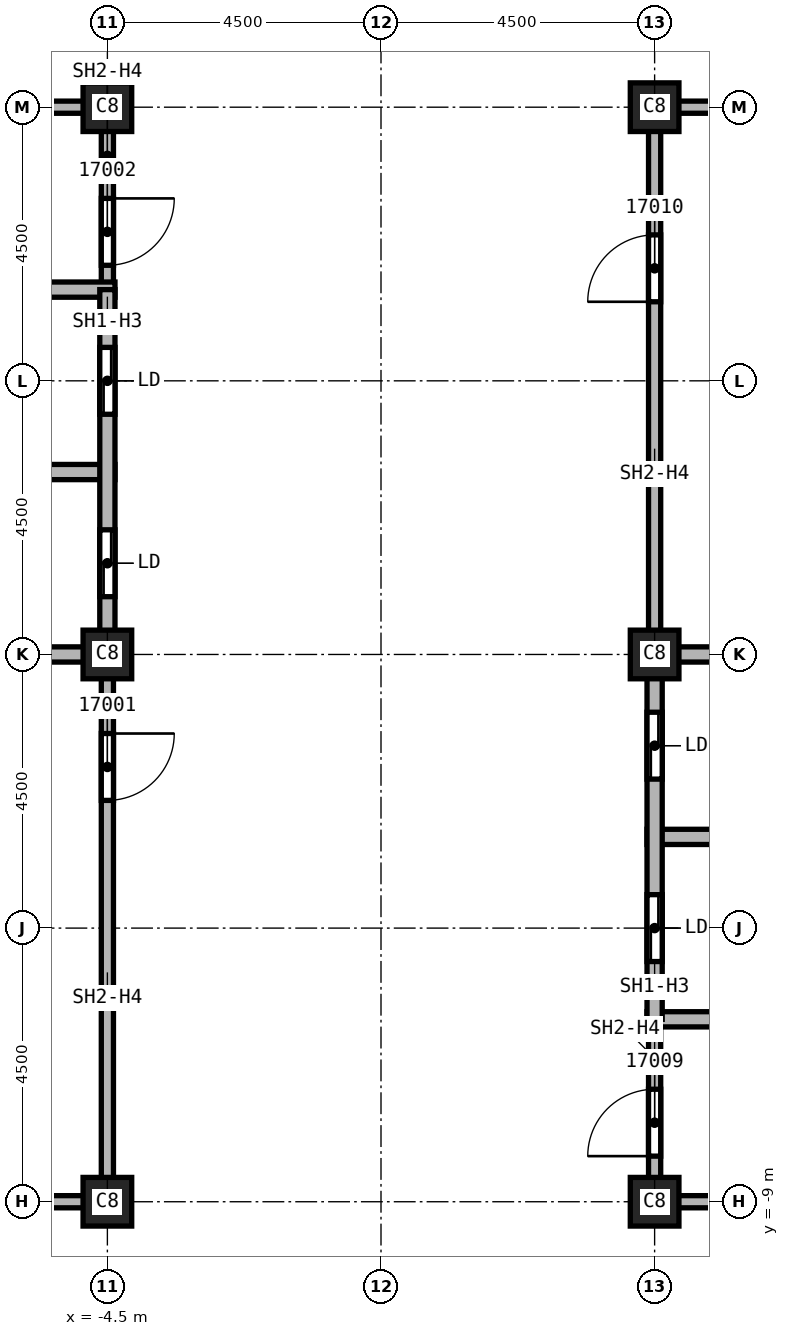
"""IFC4 building model, lengths in metres.
Left out: names, types, materials, properties, quantities, classifications, styles, units other than length and angle.
Written with IfcOpenShell. Run it as: python <this file> out.ifc"""

import sys

from ifc_helpers import new_model, si_unit, direction, frame, frame_2d, origin, origin_2d, place, context, subcontext, project, spatial, rectangle, extrude, element, fill, save


model = new_model("IFC4")
c1 = context("Model", 3, precision=1e-05, world=origin(), true_north=direction((0.0, 1.0)))
c2 = subcontext(c1, "Body", "Model", "MODEL_VIEW")
j1 = project(units=[si_unit("LENGTHUNIT", "METRE"), si_unit("PLANEANGLEUNIT", "RADIAN")], contexts=[c1])
p1 = place(None, origin())
s1 = spatial("IfcSite", under=j1, at=p1, CompositionType="ELEMENT")
p2 = place(p1, origin())
s2 = spatial("IfcBuilding", under=s1, at=p2, CompositionType="ELEMENT")
p3 = place(p2, frame((0.0, 0.0, 254.0)))
s3 = spatial("IfcBuildingStorey", under=s2, at=p3, CompositionType="ELEMENT", Elevation=254.0)
for number, where, z_axis, x_axis in (
    (1, (4.5, 0.0, 0.0), (0.0, 0.0, 1.0), (1.0, 0.0, 0.0)),
    (2, (4.5, 9.0, 0.0), (0.0, 0.0, 1.0), (1.0, 0.0, 0.0)),
    (3, (4.5, -9.0, 0.0), (0.0, 0.0, 1.0), (1.0, 0.0, 0.0)),
    (4, (-4.5, 0.0, 0.0), (0.0, 0.0, 1.0), (1.0, 0.0, 0.0)),
    (5, (-4.5, 9.0, 0.0), (0.0, 0.0, 1.0), (1.0, 0.0, 0.0)),
    (6, (-4.5, -9.0, 0.0), (0.0, 0.0, 1.0), (1.0, 0.0, 0.0)),
):
    element("IfcColumn", number, at=place(p3, frame(where, z_axis=z_axis, x_axis=x_axis)), inside=s3, PredefinedType="COLUMN", context=c2, shape_type="SweptSolid", body=[
        extrude(rectangle(XDim=0.8, YDim=0.8, at=origin_2d()), origin(), (0.0, 0.0, 1.0), 3.72),
    ])
for number, where, z_axis, x_axis in (
    (7, (-7.5, 9.0, 0.0), (0.0, 0.0, 1.0), (1.0, 0.0, 0.0)),
    (8, (-4.5, -9.0, 0.0), (0.0, 0.0, 1.0), (-1.0, 0.0, 0.0)),
):
    element("IfcWall", number, at=place(p3, frame(where, z_axis=z_axis, x_axis=x_axis)), inside=s3, PredefinedType="SOLIDWALL", context=c2, shape_type="SweptSolid", body=[
        extrude(rectangle(XDim=3.0, YDim=0.2, at=frame_2d((1.5, 0.0))), origin(), (0.0, 0.0, 1.0), 3.042),
    ])
p4 = place(p3, frame((-4.5, 0.0, 0.0), z_axis=(0.0, 0.0, 1.0), x_axis=(0.0, -1.0, 0.0)))
e9 = element("IfcWall", 9, at=p4, inside=s3, PredefinedType="SOLIDWALL", context=c2, shape_type="SweptSolid", body=[
    extrude(rectangle(XDim=9.1, YDim=0.2, at=frame_2d((4.55, 0.0))), origin(), (0.0, 0.0, 1.0), 3.042),
])
p5 = place(p4, frame((1.3, 0.0, 0.0)))
e10 = element("IfcOpeningElement", 10, at=p5, cuts=e9, PredefinedType="OPENING", context=c2, shape_type="SweptSolid", body=[
    extrude(rectangle(XDim=1.1, YDim=2.1, at=frame_2d((0.55, 1.05))), frame((0.0, 0.1, 0.0), z_axis=(0.0, -1.0, 0.0), x_axis=(1.0, 0.0, 0.0)), (0.0, 0.0, 1.0), 0.2),
])
p6 = place(p3, frame((-4.5, 9.1, 0.0), z_axis=(0.0, 0.0, 1.0), x_axis=(0.0, -1.0, 0.0)))
e11 = element("IfcWall", 11, at=p6, inside=s3, PredefinedType="SOLIDWALL", context=c2, shape_type="SweptSolid", body=[
    extrude(rectangle(XDim=3.1, YDim=0.2, at=frame_2d((1.55, 0.0))), origin(), (0.0, 0.0, 1.0), 3.042),
])
p7 = place(p6, frame((1.6, 0.0, 0.0)))
e12 = element("IfcOpeningElement", 12, at=p7, cuts=e11, PredefinedType="OPENING", context=c2, shape_type="SweptSolid", body=[
    extrude(rectangle(XDim=1.1, YDim=2.1, at=frame_2d((0.55, 1.05))), frame((0.0, 0.1, 0.0), z_axis=(0.0, -1.0, 0.0), x_axis=(1.0, 0.0, 0.0)), (0.0, 0.0, 1.0), 0.2),
])
p8 = place(p3, frame((4.5, -9.1, 0.0), z_axis=(0.0, 0.0, 1.0), x_axis=(0.0, 1.0, 0.0)))
e13 = element("IfcWall", 13, at=p8, inside=s3, PredefinedType="SOLIDWALL", context=c2, shape_type="SweptSolid", body=[
    extrude(rectangle(XDim=3.1, YDim=0.2, at=frame_2d((1.55, 0.0))), origin(), (0.0, 0.0, 1.0), 3.042),
])
p9 = place(p8, frame((0.85, 0.0, 0.0)))
e14 = element("IfcOpeningElement", 14, at=p9, cuts=e13, PredefinedType="OPENING", context=c2, shape_type="SweptSolid", body=[
    extrude(rectangle(XDim=1.1, YDim=2.1, at=frame_2d((0.55, 1.05))), frame((0.0, 0.1, 0.0), z_axis=(0.0, -1.0, 0.0), x_axis=(1.0, 0.0, 0.0)), (0.0, 0.0, 1.0), 0.2),
])
p10 = place(p3, frame((4.5, 0.0, 0.0), z_axis=(0.0, 0.0, 1.0), x_axis=(0.0, 1.0, 0.0)))
e15 = element("IfcWall", 15, at=p10, inside=s3, PredefinedType="SOLIDWALL", context=c2, shape_type="SweptSolid", body=[
    extrude(rectangle(XDim=9.1, YDim=0.2, at=frame_2d((4.55, 0.0))), origin(), (0.0, 0.0, 1.0), 3.042),
])
p11 = place(p10, frame((5.8, 0.0, 0.0)))
e16 = element("IfcOpeningElement", 16, at=p11, cuts=e15, PredefinedType="OPENING", context=c2, shape_type="SweptSolid", body=[
    extrude(rectangle(XDim=1.1, YDim=2.1, at=frame_2d((0.55, 1.05))), frame((0.0, 0.1, 0.0), z_axis=(0.0, -1.0, 0.0), x_axis=(1.0, 0.0, 0.0)), (0.0, 0.0, 1.0), 0.2),
])
for number, where, z_axis, x_axis in (
    (17, (4.5, 9.0, 0.0), (0.0, 0.0, 1.0), (1.0, 0.0, 0.0)),
    (18, (7.5, -9.0, 0.0), (0.0, 0.0, 1.0), (-1.0, 0.0, 0.0)),
):
    element("IfcWall", number, at=place(p3, frame(where, z_axis=z_axis, x_axis=x_axis)), inside=s3, PredefinedType="SOLIDWALL", context=c2, shape_type="SweptSolid", body=[
        extrude(rectangle(XDim=3.0, YDim=0.2, at=frame_2d((1.5, 0.0))), origin(), (0.0, 0.0, 1.0), 3.042),
    ])
p12 = place(p3, frame((-13.625, 3.0, 0.0), z_axis=(0.0, 0.0, 1.0), x_axis=(1.0, 0.0, 0.0)))
e19 = element("IfcWall", 19, at=p12, inside=s3, PredefinedType="SOLIDWALL", context=c2, shape_type="SweptSolid", body=[
    extrude(rectangle(XDim=9.25, YDim=0.25, at=frame_2d((4.625, 0.0))), origin(), (0.0, 0.0, 1.0), 3.72),
])
p13 = place(p12, frame((3.25, 0.0, 0.0)))
e20 = element("IfcOpeningElement", 20, at=p13, cuts=e19, PredefinedType="OPENING", context=c2, shape_type="SweptSolid", body=[
    extrude(rectangle(XDim=1.1, YDim=2.1, at=frame_2d((0.55, 1.05))), frame((0.0, 0.125, 0.0), z_axis=(0.0, -1.0, 0.0), x_axis=(1.0, 0.0, 0.0)), (0.0, 0.0, 1.0), 0.25),
])
for number, where, z_axis, x_axis in (
    (21, (-7.625, 0.0, 0.0), (0.0, 0.0, 1.0), (1.0, 0.0, 0.0)),
    (22, (-7.625, 6.0, 0.0), (0.0, 0.0, 1.0), (1.0, 0.0, 0.0)),
):
    element("IfcWall", number, at=place(p3, frame(where, z_axis=z_axis, x_axis=x_axis)), inside=s3, PredefinedType="SOLIDWALL", context=c2, shape_type="SweptSolid", body=[
        extrude(rectangle(XDim=3.25, YDim=0.25, at=frame_2d((1.625, 0.0))), origin(), (0.0, 0.0, 1.0), 3.72),
    ])
p14 = place(p3, frame((-4.5, 6.0, 0.0), z_axis=(0.0, 0.0, 1.0), x_axis=(0.0, -1.0, 0.0)))
e23 = element("IfcWall", 23, at=p14, inside=s3, PredefinedType="SOLIDWALL", context=c2, shape_type="SweptSolid", body=[
    extrude(rectangle(XDim=6.0, YDim=0.25, at=frame_2d((3.0, 0.0))), origin(), (0.0, 0.0, 1.0), 3.042),
])
p15 = place(p14, frame((3.95, 0.0, 0.0)))
e24 = element("IfcOpeningElement", 24, at=p15, cuts=e23, PredefinedType="OPENING", context=c2, shape_type="SweptSolid", body=[
    extrude(rectangle(XDim=1.1, YDim=2.1, at=frame_2d((0.55, 1.05))), frame((0.0, 0.125, 0.0), z_axis=(0.0, -1.0, 0.0), x_axis=(1.0, 0.0, 0.0)), (0.0, 0.0, 1.0), 0.25),
])
p16 = place(p14, frame((0.95, 0.0, 0.0)))
e25 = element("IfcOpeningElement", 25, at=p16, cuts=e23, PredefinedType="OPENING", context=c2, shape_type="SweptSolid", body=[
    extrude(rectangle(XDim=1.1, YDim=2.1, at=frame_2d((0.55, 1.05))), frame((0.0, 0.125, 0.0), z_axis=(0.0, -1.0, 0.0), x_axis=(1.0, 0.0, 0.0)), (0.0, 0.0, 1.0), 0.25),
])
p17 = place(p3, frame((4.375, -6.0, 0.0), z_axis=(0.0, 0.0, 1.0), x_axis=(1.0, 0.0, 0.0)))
e26 = element("IfcWall", 26, at=p17, inside=s3, PredefinedType="SOLIDWALL", context=c2, shape_type="SweptSolid", body=[
    extrude(rectangle(XDim=3.25, YDim=0.25, at=frame_2d((1.625, 0.0))), origin(), (0.0, 0.0, 1.0), 3.72),
])
p18 = place(p3, frame((4.375, -3.0, 0.0), z_axis=(0.0, 0.0, 1.0), x_axis=(1.0, 0.0, 0.0)))
e27 = element("IfcWall", 27, at=p18, inside=s3, PredefinedType="SOLIDWALL", context=c2, shape_type="SweptSolid", body=[
    extrude(rectangle(XDim=9.25, YDim=0.25, at=frame_2d((4.625, 0.0))), origin(), (0.0, 0.0, 1.0), 3.72),
])
p19 = place(p18, frame((4.125, 0.0, 0.0)))
e28 = element("IfcOpeningElement", 28, at=p19, cuts=e27, PredefinedType="OPENING", context=c2, shape_type="SweptSolid", body=[
    extrude(rectangle(XDim=1.1, YDim=2.1, at=frame_2d((0.55, 1.05))), frame((0.0, 0.125, 0.0), z_axis=(0.0, -1.0, 0.0), x_axis=(1.0, 0.0, 0.0)), (0.0, 0.0, 1.0), 0.25),
])
p20 = place(p3, frame((4.375, 0.0, 0.0), z_axis=(0.0, 0.0, 1.0), x_axis=(1.0, 0.0, 0.0)))
e29 = element("IfcWall", 29, at=p20, inside=s3, PredefinedType="SOLIDWALL", context=c2, shape_type="SweptSolid", body=[
    extrude(rectangle(XDim=3.25, YDim=0.25, at=frame_2d((1.625, 0.0))), origin(), (0.0, 0.0, 1.0), 3.72),
])
p21 = place(p3, frame((4.5, -6.0, 0.0), z_axis=(0.0, 0.0, 1.0), x_axis=(0.0, 1.0, 0.0)))
e30 = element("IfcWall", 30, at=p21, inside=s3, PredefinedType="SOLIDWALL", context=c2, shape_type="SweptSolid", body=[
    extrude(rectangle(XDim=6.0, YDim=0.25, at=frame_2d((3.0, 0.0))), origin(), (0.0, 0.0, 1.0), 3.042),
])
p22 = place(p21, frame((0.95, 0.0, 0.0)))
e31 = element("IfcOpeningElement", 31, at=p22, cuts=e30, PredefinedType="OPENING", context=c2, shape_type="SweptSolid", body=[
    extrude(rectangle(XDim=1.1, YDim=2.1, at=frame_2d((0.55, 1.05))), frame((0.0, 0.125, 0.0), z_axis=(0.0, -1.0, 0.0), x_axis=(1.0, 0.0, 0.0)), (0.0, 0.0, 1.0), 0.25),
])
p23 = place(p21, frame((3.95, 0.0, 0.0)))
e32 = element("IfcOpeningElement", 32, at=p23, cuts=e30, PredefinedType="OPENING", context=c2, shape_type="SweptSolid", body=[
    extrude(rectangle(XDim=1.1, YDim=2.1, at=frame_2d((0.55, 1.05))), frame((0.0, 0.125, 0.0), z_axis=(0.0, -1.0, 0.0), x_axis=(1.0, 0.0, 0.0)), (0.0, 0.0, 1.0), 0.25),
])
p24 = place(p5, origin())
e33 = element("IfcDoor", 33, at=p24, inside=s3, OperationType="SINGLE_SWING_RIGHT", PredefinedType="DOOR", context=c2, shape_type="SweptSolid", body=[
    extrude(rectangle(XDim=1.1, YDim=2.1, at=frame_2d((0.55, 1.05))), frame((0.0, 0.025, 0.0), z_axis=(0.0, -1.0, 0.0), x_axis=(1.0, 0.0, 0.0)), (0.0, 0.0, 1.0), 0.05),
])
fill(e10, e33)
p25 = place(p7, origin())
e34 = element("IfcDoor", 34, at=p25, inside=s3, OperationType="SINGLE_SWING_LEFT", PredefinedType="DOOR", context=c2, shape_type="SweptSolid", body=[
    extrude(rectangle(XDim=1.1, YDim=2.1, at=frame_2d((0.55, 1.05))), frame((0.0, 0.025, 0.0), z_axis=(0.0, -1.0, 0.0), x_axis=(1.0, 0.0, 0.0)), (0.0, 0.0, 1.0), 0.05),
])
fill(e12, e34)
p26 = place(p9, origin())
e35 = element("IfcDoor", 35, at=p26, inside=s3, OperationType="SINGLE_SWING_RIGHT", PredefinedType="DOOR", context=c2, shape_type="SweptSolid", body=[
    extrude(rectangle(XDim=1.1, YDim=2.1, at=frame_2d((0.55, 1.05))), frame((0.0, 0.025, 0.0), z_axis=(0.0, -1.0, 0.0), x_axis=(1.0, 0.0, 0.0)), (0.0, 0.0, 1.0), 0.05),
])
fill(e14, e35)
p27 = place(p11, origin())
e36 = element("IfcDoor", 36, at=p27, inside=s3, OperationType="SINGLE_SWING_LEFT", PredefinedType="DOOR", context=c2, shape_type="SweptSolid", body=[
    extrude(rectangle(XDim=1.1, YDim=2.1, at=frame_2d((0.55, 1.05))), frame((0.0, 0.025, 0.0), z_axis=(0.0, -1.0, 0.0), x_axis=(1.0, 0.0, 0.0)), (0.0, 0.0, 1.0), 0.05),
])
fill(e16, e36)
p28 = place(p15, origin())
e37 = element("IfcDoor", 37, at=p28, inside=s3, OperationType="SLIDING_TO_LEFT", PredefinedType="DOOR", context=c2, shape_type="SweptSolid", body=[
    extrude(rectangle(XDim=1.1, YDim=2.1, at=frame_2d((0.55, 1.05))), frame((0.0, 0.025, 0.0), z_axis=(0.0, -1.0, 0.0), x_axis=(1.0, 0.0, 0.0)), (0.0, 0.0, 1.0), 0.05),
])
fill(e24, e37)
p29 = place(p16, origin())
e38 = element("IfcDoor", 38, at=p29, inside=s3, OperationType="SLIDING_TO_LEFT", PredefinedType="DOOR", context=c2, shape_type="SweptSolid", body=[
    extrude(rectangle(XDim=1.1, YDim=2.1, at=frame_2d((0.55, 1.05))), frame((0.0, 0.025, 0.0), z_axis=(0.0, -1.0, 0.0), x_axis=(1.0, 0.0, 0.0)), (0.0, 0.0, 1.0), 0.05),
])
fill(e25, e38)
p30 = place(p22, origin())
e39 = element("IfcDoor", 39, at=p30, inside=s3, OperationType="SLIDING_TO_LEFT", PredefinedType="DOOR", context=c2, shape_type="SweptSolid", body=[
    extrude(rectangle(XDim=1.1, YDim=2.1, at=frame_2d((0.55, 1.05))), frame((0.0, 0.025, 0.0), z_axis=(0.0, -1.0, 0.0), x_axis=(1.0, 0.0, 0.0)), (0.0, 0.0, 1.0), 0.05),
])
fill(e31, e39)
p31 = place(p23, origin())
e40 = element("IfcDoor", 40, at=p31, inside=s3, OperationType="SLIDING_TO_LEFT", PredefinedType="DOOR", context=c2, shape_type="SweptSolid", body=[
    extrude(rectangle(XDim=1.1, YDim=2.1, at=frame_2d((0.55, 1.05))), frame((0.0, 0.025, 0.0), z_axis=(0.0, -1.0, 0.0), x_axis=(1.0, 0.0, 0.0)), (0.0, 0.0, 1.0), 0.05),
])
fill(e32, e40)
save(model, sys.argv[1])
